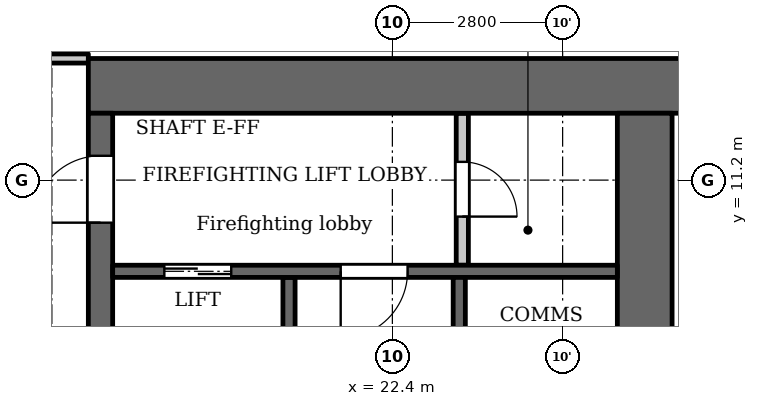
"""IFC4 building model, lengths in metres.
Left out: names, types, materials, properties, quantities, classifications, styles, units other than length and angle.
Written with IfcOpenShell. Run it as: python <this file> out.ifc"""

import sys

from ifc_helpers import new_model, si_unit, direction, frame, frame_2d, origin, place, context, subcontext, project, spatial, rectangle, extrude, element, fill, save


model = new_model("IFC4")
c1 = context("Model", 3, precision=1e-05, world=origin(), true_north=direction((0.0, 1.0)))
c2 = subcontext(c1, "Body", "Model", "MODEL_VIEW")
j1 = project(units=[si_unit("LENGTHUNIT", "METRE"), si_unit("PLANEANGLEUNIT", "RADIAN")], contexts=[c1])
p1 = place(None, origin())
s1 = spatial("IfcSite", under=j1, at=p1, CompositionType="ELEMENT")
p2 = place(p1, origin())
s2 = spatial("IfcBuilding", under=s1, at=p2, CompositionType="ELEMENT")
p3 = place(p2, frame((0.0, 0.0, 41.0)))
s3 = spatial("IfcBuildingStorey", under=s2, at=p3, CompositionType="ELEMENT", Elevation=41.0)
p4 = place(p3, frame((20.7, 2.6, 0.0), z_axis=(0.0, 0.0, 1.0), x_axis=(0.0, 1.0, 0.0)))
e1 = element("IfcWall", 1, at=p4, inside=s3, PredefinedType="SHEAR", context=c2, shape_type="SweptSolid", body=[
    extrude(rectangle(XDim=7.0, YDim=0.2, at=frame_2d((3.5, 0.0))), origin(), (0.0, 0.0, 1.0), 3.2),
])
p5 = place(p3, frame((17.4, 12.75, 0.0), z_axis=(0.0, 0.0, 1.0), x_axis=(1.0, 0.0, 0.0)))
e2 = element("IfcWall", 2, at=p5, inside=s3, PredefinedType="SHEAR", context=c2, shape_type="SweptSolid", body=[
    extrude(rectangle(XDim=10.4, YDim=0.9, at=frame_2d((5.2, 0.0))), origin(), (0.0, 0.0, 1.0), 3.2),
])
p6 = place(p3, frame((17.6, -12.3, 0.0), z_axis=(0.0, 0.0, 1.0), x_axis=(0.0, 1.0, 0.0)))
e3 = element("IfcWall", 3, at=p6, inside=s3, PredefinedType="SHEAR", context=c2, shape_type="SweptSolid", body=[
    extrude(rectangle(XDim=24.6, YDim=0.4, at=frame_2d((12.3, 0.0))), origin(), (0.0, 0.0, 1.0), 3.2),
])
p7 = place(p6, frame((6.0, 0.0, 0.0)))
e4 = element("IfcOpeningElement", 4, at=p7, cuts=e3, PredefinedType="OPENING", context=c2, shape_type="SweptSolid", body=[
    extrude(rectangle(XDim=1.1, YDim=2.1, at=frame_2d((0.55, 1.05))), frame((0.0, 0.21, 0.0), z_axis=(0.0, -1.0, 0.0), x_axis=(1.0, 0.0, 0.0)), (0.0, 0.0, 1.0), 0.42),
])
p8 = place(p6, frame((8.4, 0.0, 0.0)))
e5 = element("IfcOpeningElement", 5, at=p8, cuts=e3, PredefinedType="OPENING", context=c2, shape_type="SweptSolid", body=[
    extrude(rectangle(XDim=1.1, YDim=2.1, at=frame_2d((0.55, 1.05))), frame((0.0, 0.21, 0.0), z_axis=(0.0, -1.0, 0.0), x_axis=(1.0, 0.0, 0.0)), (0.0, 0.0, 1.0), 0.42),
])
p9 = place(p6, frame((10.8, 0.0, 0.0)))
e6 = element("IfcOpeningElement", 6, at=p9, cuts=e3, PredefinedType="OPENING", context=c2, shape_type="SweptSolid", body=[
    extrude(rectangle(XDim=1.1, YDim=2.1, at=frame_2d((0.55, 1.05))), frame((0.0, 0.21, 0.0), z_axis=(0.0, -1.0, 0.0), x_axis=(1.0, 0.0, 0.0)), (0.0, 0.0, 1.0), 0.42),
])
p10 = place(p6, frame((16.75, 0.0, 0.0)))
e7 = element("IfcOpeningElement", 7, at=p10, cuts=e3, PredefinedType="OPENING", context=c2, shape_type="SweptSolid", body=[
    extrude(rectangle(XDim=0.9, YDim=2.1, at=frame_2d((0.45, 1.05))), frame((0.0, 0.21, 0.0), z_axis=(0.0, -1.0, 0.0), x_axis=(1.0, 0.0, 0.0)), (0.0, 0.0, 1.0), 0.42),
])
p11 = place(p6, frame((22.8, 0.0, 0.0)))
e8 = element("IfcOpeningElement", 8, at=p11, cuts=e3, PredefinedType="OPENING", context=c2, shape_type="SweptSolid", body=[
    extrude(rectangle(XDim=1.1, YDim=2.1, at=frame_2d((0.55, 1.05))), frame((0.0, 0.21, 0.0), z_axis=(0.0, -1.0, 0.0), x_axis=(1.0, 0.0, 0.0)), (0.0, 0.0, 1.0), 0.42),
])
p12 = place(p6, frame((0.7, 0.0, 0.0)))
e9 = element("IfcOpeningElement", 9, at=p12, cuts=e3, PredefinedType="OPENING", context=c2, shape_type="SweptSolid", body=[
    extrude(rectangle(XDim=1.1, YDim=2.1, at=frame_2d((0.55, 1.05))), frame((0.0, 0.21, 0.0), z_axis=(0.0, -1.0, 0.0), x_axis=(1.0, 0.0, 0.0)), (0.0, 0.0, 1.0), 0.42),
])
p13 = place(p6, frame((12.775, 0.0, 0.0)))
e10 = element("IfcOpeningElement", 10, at=p13, cuts=e3, PredefinedType="OPENING", context=c2, shape_type="SweptSolid", body=[
    extrude(rectangle(XDim=1.8, YDim=2.1, at=frame_2d((0.9, 1.05))), frame((0.0, 0.21, 0.0), z_axis=(0.0, -1.0, 0.0), x_axis=(1.0, 0.0, 0.0)), (0.0, 0.0, 1.0), 0.42),
])
p14 = place(p3, frame((26.55, -12.3, 0.0), z_axis=(0.0, 0.0, 1.0), x_axis=(0.0, 1.0, 0.0)))
e11 = element("IfcWall", 11, at=p14, inside=s3, PredefinedType="SHEAR", context=c2, shape_type="SweptSolid", body=[
    extrude(rectangle(XDim=24.6, YDim=0.9, at=frame_2d((12.3, 0.0))), origin(), (0.0, 0.0, 1.0), 3.2),
])
p15 = place(p3, frame((23.55, 9.8, 0.0), z_axis=(0.0, 0.0, 1.0), x_axis=(0.0, 1.0, 0.0)))
e12 = element("IfcWall", 12, at=p15, inside=s3, PredefinedType="PARTITIONING", context=c2, shape_type="SweptSolid", body=[
    extrude(rectangle(XDim=2.5, YDim=0.2, at=frame_2d((1.25, 0.0))), origin(), (0.0, 0.0, 1.0), 3.2),
])
p16 = place(p15, frame((0.8, 0.0, 0.0)))
e13 = element("IfcOpeningElement", 13, at=p16, cuts=e12, PredefinedType="OPENING", context=c2, shape_type="SweptSolid", body=[
    extrude(rectangle(XDim=0.9, YDim=2.1, at=frame_2d((0.45, 1.05))), frame((0.0, 0.11, 0.0), z_axis=(0.0, -1.0, 0.0), x_axis=(1.0, 0.0, 0.0)), (0.0, 0.0, 1.0), 0.22),
])
p17 = place(p3, frame((17.8, 9.7, 0.0), z_axis=(0.0, 0.0, 1.0), x_axis=(1.0, 0.0, 0.0)))
e14 = element("IfcWall", 14, at=p17, inside=s3, PredefinedType="SHEAR", context=c2, shape_type="SweptSolid", body=[
    extrude(rectangle(XDim=8.3, YDim=0.2, at=frame_2d((4.15, 0.0))), origin(), (0.0, 0.0, 1.0), 3.2),
])
p18 = place(p17, frame((0.85, 0.0, 0.0)))
e15 = element("IfcOpeningElement", 15, at=p18, cuts=e14, PredefinedType="OPENING", context=c2, shape_type="SweptSolid", body=[
    extrude(rectangle(XDim=1.1, YDim=2.1, at=frame_2d((0.55, 1.05))), frame((0.0, 0.11, 0.0), z_axis=(0.0, -1.0, 0.0), x_axis=(1.0, 0.0, 0.0)), (0.0, 0.0, 1.0), 0.22),
])
p19 = place(p17, frame((3.75, 0.0, 0.0)))
e16 = element("IfcOpeningElement", 16, at=p19, cuts=e14, PredefinedType="OPENING", context=c2, shape_type="SweptSolid", body=[
    extrude(rectangle(XDim=1.1, YDim=2.1, at=frame_2d((0.55, 1.05))), frame((0.0, 0.11, 0.0), z_axis=(0.0, -1.0, 0.0), x_axis=(1.0, 0.0, 0.0)), (0.0, 0.0, 1.0), 0.22),
])
p20 = place(p3, frame((23.5, 2.6, 0.0), z_axis=(0.0, 0.0, 1.0), x_axis=(0.0, 1.0, 0.0)))
e17 = element("IfcWall", 17, at=p20, inside=s3, PredefinedType="SHEAR", context=c2, shape_type="SweptSolid", body=[
    extrude(rectangle(XDim=7.0, YDim=0.2, at=frame_2d((3.5, 0.0))), origin(), (0.0, 0.0, 1.0), 3.2),
])
p21 = place(p3, frame((-17.4, 13.2, 0.0), z_axis=(0.0, 0.0, 1.0), x_axis=(1.0, 0.0, 0.0)))
e18 = element("IfcWall", 18, at=p21, inside=s3, PredefinedType="PARTITIONING", context=c2, shape_type="SweptSolid", body=[
    extrude(rectangle(XDim=34.8, YDim=0.15, at=frame_2d((17.4, 0.0))), origin(), (0.0, 0.0, 1.0), 3.2),
])
p22 = place(p21, frame((0.75, 0.0, 0.0)))
e19 = element("IfcOpeningElement", 19, at=p22, cuts=e18, PredefinedType="OPENING", context=c2, shape_type="SweptSolid", body=[
    extrude(rectangle(XDim=1.0, YDim=2.1, at=frame_2d((0.5, 1.05))), frame((0.0, 0.085, 0.0), z_axis=(0.0, -1.0, 0.0), x_axis=(1.0, 0.0, 0.0)), (0.0, 0.0, 1.0), 0.17),
])
p23 = place(p21, frame((33.15, 0.0, 0.0)))
e20 = element("IfcOpeningElement", 20, at=p23, cuts=e18, PredefinedType="OPENING", context=c2, shape_type="SweptSolid", body=[
    extrude(rectangle(XDim=1.0, YDim=2.1, at=frame_2d((0.5, 1.05))), frame((0.0, 0.085, 0.0), z_axis=(0.0, -1.0, 0.0), x_axis=(1.0, 0.0, 0.0)), (0.0, 0.0, 1.0), 0.17),
])
p24 = place(p21, frame((3.05, 0.0, 0.0)))
e21 = element("IfcOpeningElement", 21, at=p24, cuts=e18, PredefinedType="OPENING", context=c2, shape_type="SweptSolid", body=[
    extrude(rectangle(XDim=1.0, YDim=2.1, at=frame_2d((0.5, 1.05))), frame((0.0, 0.085, 0.0), z_axis=(0.0, -1.0, 0.0), x_axis=(1.0, 0.0, 0.0)), (0.0, 0.0, 1.0), 0.17),
])
p25 = place(p21, frame((12.45, 0.0, 0.0)))
e22 = element("IfcOpeningElement", 22, at=p25, cuts=e18, PredefinedType="OPENING", context=c2, shape_type="SweptSolid", body=[
    extrude(rectangle(XDim=1.0, YDim=2.1, at=frame_2d((0.5, 1.05))), frame((0.0, 0.085, 0.0), z_axis=(0.0, -1.0, 0.0), x_axis=(1.0, 0.0, 0.0)), (0.0, 0.0, 1.0), 0.17),
])
p26 = place(p21, frame((18.3, 0.0, 0.0)))
e23 = element("IfcOpeningElement", 23, at=p26, cuts=e18, PredefinedType="OPENING", context=c2, shape_type="SweptSolid", body=[
    extrude(rectangle(XDim=1.0, YDim=2.1, at=frame_2d((0.5, 1.05))), frame((0.0, 0.085, 0.0), z_axis=(0.0, -1.0, 0.0), x_axis=(1.0, 0.0, 0.0)), (0.0, 0.0, 1.0), 0.17),
])
p27 = place(p21, frame((29.25, 0.0, 0.0)))
e24 = element("IfcOpeningElement", 24, at=p27, cuts=e18, PredefinedType="OPENING", context=c2, shape_type="SweptSolid", body=[
    extrude(rectangle(XDim=1.0, YDim=2.1, at=frame_2d((0.5, 1.05))), frame((0.0, 0.085, 0.0), z_axis=(0.0, -1.0, 0.0), x_axis=(1.0, 0.0, 0.0)), (0.0, 0.0, 1.0), 0.17),
])
p28 = place(p18, origin())
e25 = element("IfcDoor", 25, at=p28, inside=s3, OperationType="DOUBLE_DOOR_SLIDING", PredefinedType="DOOR", context=c2, shape_type="SweptSolid", body=[
    extrude(rectangle(XDim=1.1, YDim=2.1, at=frame_2d((0.55, 1.05))), frame((0.0, 0.025, 0.0), z_axis=(0.0, -1.0, 0.0), x_axis=(1.0, 0.0, 0.0)), (0.0, 0.0, 1.0), 0.05),
])
fill(e15, e25)
p29 = place(p11, origin())
e26 = element("IfcDoor", 26, at=p29, inside=s3, OperationType="SINGLE_SWING_RIGHT", PredefinedType="DOOR", context=c2, shape_type="SweptSolid", body=[
    extrude(rectangle(XDim=1.1, YDim=2.1, at=frame_2d((0.55, 1.05))), frame((0.0, 0.025, 0.0), z_axis=(0.0, -1.0, 0.0), x_axis=(1.0, 0.0, 0.0)), (0.0, 0.0, 1.0), 0.05),
])
fill(e8, e26)
p30 = place(p16, origin())
e27 = element("IfcDoor", 27, at=p30, inside=s3, OperationType="SINGLE_SWING_LEFT", PredefinedType="DOOR", context=c2, shape_type="SweptSolid", body=[
    extrude(rectangle(XDim=0.9, YDim=2.1, at=frame_2d((0.45, 1.05))), frame((0.0, 0.025, 0.0), z_axis=(0.0, -1.0, 0.0), x_axis=(1.0, 0.0, 0.0)), (0.0, 0.0, 1.0), 0.05),
])
fill(e13, e27)
p31 = place(p19, origin())
e28 = element("IfcDoor", 28, at=p31, inside=s3, OperationType="SINGLE_SWING_LEFT", PredefinedType="DOOR", context=c2, shape_type="SweptSolid", body=[
    extrude(rectangle(XDim=1.1, YDim=2.1, at=frame_2d((0.55, 1.05))), frame((0.0, 0.025, 0.0), z_axis=(0.0, -1.0, 0.0), x_axis=(1.0, 0.0, 0.0)), (0.0, 0.0, 1.0), 0.05),
])
fill(e16, e28)
save(model, sys.argv[1])
